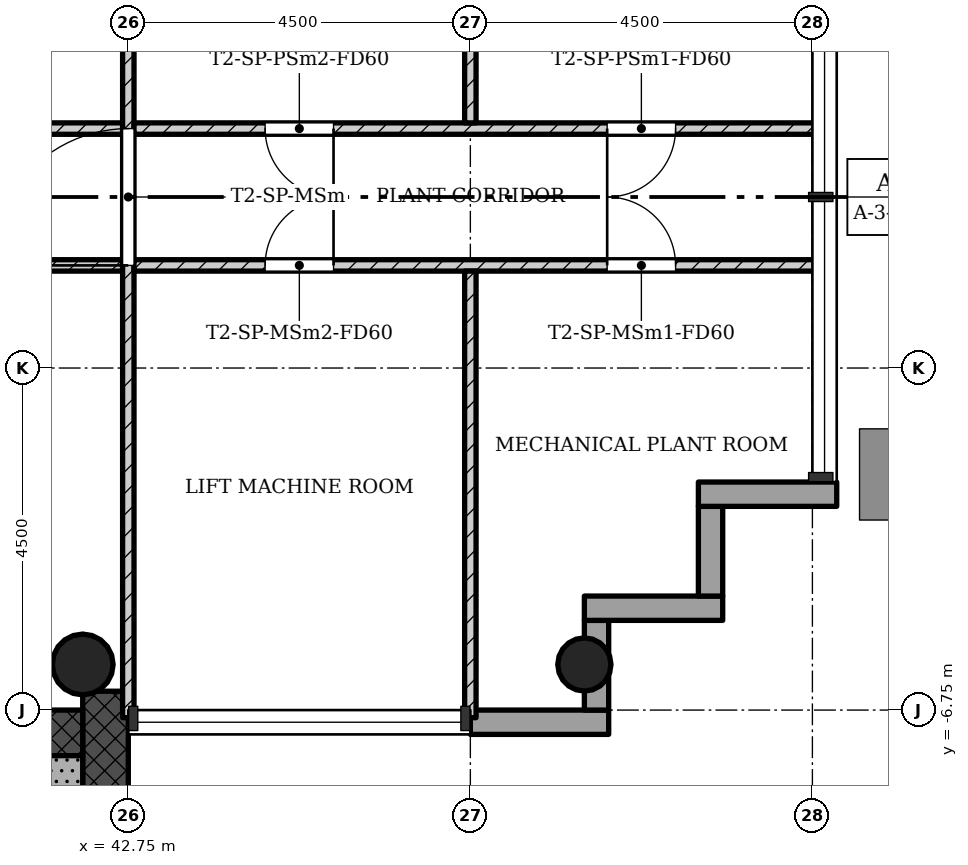
"""IFC4 building model, lengths in metres.
Left out: names, types, materials, properties, quantities, classifications, styles, units other than length and angle.
Written with IfcOpenShell. Run it as: python <this file> out.ifc"""

import sys

from ifc_helpers import new_model, si_unit, direction, frame, frame_2d, origin, origin_2d, place, context, subcontext, project, spatial, rectangle, hollow_circle, extrude, element, fill, save


model = new_model("IFC4")
c1 = context("Model", 3, precision=1e-05, world=origin(), true_north=direction((0.0, 1.0)))
c2 = subcontext(c1, "Body", "Model", "MODEL_VIEW")
j1 = project(units=[si_unit("LENGTHUNIT", "METRE"), si_unit("PLANEANGLEUNIT", "RADIAN")], contexts=[c1])
p1 = place(None, origin())
s1 = spatial("IfcSite", under=j1, at=p1, CompositionType="ELEMENT")
p2 = place(p1, origin())
s2 = spatial("IfcBuilding", under=s1, at=p2, CompositionType="ELEMENT")
p3 = place(p2, frame((0.0, 0.0, 233.4)))
s3 = spatial("IfcBuildingStorey", under=s2, at=p3, CompositionType="ELEMENT", Elevation=233.4)
p4 = place(p3, frame((42.45, -15.15, 0.0), z_axis=(0.0, 0.0, 1.0), x_axis=(0.0, 1.0, 0.0)))
e1 = element("IfcWall", 1, at=p4, inside=s3, PredefinedType="SHEAR", context=c2, shape_type="SweptSolid", body=[
    extrude(rectangle(XDim=8.648, YDim=0.6, at=frame_2d((4.324, 0.0))), origin(), (0.0, 0.0, 1.0), 4.5),
])
p5 = place(p3, frame((42.15, -7.05, 0.0), z_axis=(0.0, 0.0, 1.0), x_axis=(-1.0, 0.0, 0.0)))
e2 = element("IfcWall", 2, at=p5, inside=s3, PredefinedType="SHEAR", context=c2, shape_type="SweptSolid", body=[
    extrude(rectangle(XDim=12.9, YDim=0.6, at=frame_2d((6.45, 0.0))), origin(), (0.0, 0.0, 1.0), 4.5),
])
p6 = place(p5, frame((5.25, 0.0, 0.0)))
e3 = element("IfcOpeningElement", 3, at=p6, cuts=e2, PredefinedType="OPENING", context=c2, shape_type="SweptSolid", body=[
    extrude(rectangle(XDim=1.8, YDim=2.1, at=frame_2d((0.9, 1.05))), frame((0.0, 0.31, 0.0), z_axis=(0.0, -1.0, 0.0), x_axis=(1.0, 0.0, 0.0)), (0.0, 0.0, 1.0), 0.62),
])
p7 = place(p3, frame((48.75, -6.15, 0.0), z_axis=(0.0, 0.0, 1.0), x_axis=(1.0, 0.0, 0.0)))
e4 = element("IfcColumn", 4, at=p7, inside=s3, PredefinedType="COLUMN", context=c2, shape_type="SweptSolid", body=[
    extrude(hollow_circle(Radius=0.35, WallThickness=0.025, at=origin_2d()), origin(), (0.0, 0.0, 1.0), 4.5),
])
p8 = place(p3, frame((42.15, -6.15, 0.0), z_axis=(0.0, 0.0, 1.0), x_axis=(1.0, 0.0, 0.0)))
e5 = element("IfcColumn", 5, at=p8, inside=s3, PredefinedType="COLUMN", context=c2, shape_type="SweptSolid", body=[
    extrude(hollow_circle(Radius=0.4, WallThickness=0.028, at=origin_2d()), origin(), (0.0, 0.0, 1.0), 4.5),
])
p9 = place(p3, frame((47.25, -6.91, -0.3), z_axis=(0.0, 0.0, 1.0), x_axis=(1.0, 0.0, 0.0)))
e6 = element("IfcWall", 6, at=p9, inside=s3, PredefinedType="STANDARD", context=c2, shape_type="SweptSolid", body=[
    extrude(rectangle(XDim=1.82, YDim=0.32, at=frame_2d((0.91, 0.0))), origin(), (0.0, 0.0, 1.0), 4.5),
])
p10 = place(p3, frame((48.91, -6.75, -0.3), z_axis=(0.0, 0.0, 1.0), x_axis=(0.0, 1.0, 0.0)))
e7 = element("IfcWall", 7, at=p10, inside=s3, PredefinedType="STANDARD", context=c2, shape_type="SweptSolid", body=[
    extrude(rectangle(XDim=1.18, YDim=0.32, at=frame_2d((0.59, 0.0))), origin(), (0.0, 0.0, 1.0), 4.5),
])
p11 = place(p3, frame((48.75, -5.41, -0.3), z_axis=(0.0, 0.0, 1.0), x_axis=(1.0, 0.0, 0.0)))
e8 = element("IfcWall", 8, at=p11, inside=s3, PredefinedType="STANDARD", context=c2, shape_type="SweptSolid", body=[
    extrude(rectangle(XDim=1.82, YDim=0.32, at=frame_2d((0.91, 0.0))), origin(), (0.0, 0.0, 1.0), 4.5),
])
p12 = place(p3, frame((50.41, -5.25, -0.3), z_axis=(0.0, 0.0, 1.0), x_axis=(0.0, 1.0, 0.0)))
e9 = element("IfcWall", 9, at=p12, inside=s3, PredefinedType="STANDARD", context=c2, shape_type="SweptSolid", body=[
    extrude(rectangle(XDim=1.18, YDim=0.32, at=frame_2d((0.59, 0.0))), origin(), (0.0, 0.0, 1.0), 4.5),
])
p13 = place(p3, frame((50.25, -3.91, -0.3), z_axis=(0.0, 0.0, 1.0), x_axis=(1.0, 0.0, 0.0)))
e10 = element("IfcWall", 10, at=p13, inside=s3, PredefinedType="STANDARD", context=c2, shape_type="SweptSolid", body=[
    extrude(rectangle(XDim=1.82, YDim=0.32, at=frame_2d((0.91, 0.0))), origin(), (0.0, 0.0, 1.0), 4.5),
])
for number, where, z_axis, x_axis in (
    (11, (42.675, 0.9, 0.0), (0.0, 0.0, 1.0), (-1.0, 0.0, 0.0)),
    (12, (42.675, -0.9, 0.0), (0.0, 0.0, 1.0), (-1.0, 0.0, 0.0)),
):
    element("IfcWall", number, at=place(p3, frame(where, z_axis=z_axis, x_axis=x_axis)), inside=s3, PredefinedType="PARTITIONING", context=c2, shape_type="SweptSolid", body=[
        extrude(rectangle(XDim=5.7, YDim=0.15, at=frame_2d((2.85, 0.0))), origin(), (0.0, 0.0, 1.0), 4.1),
    ])
p14 = place(p3, frame((42.75, -6.85, 0.0), z_axis=(0.0, 0.0, 1.0), x_axis=(0.0, 1.0, 0.0)))
e13 = element("IfcWall", 13, at=p14, inside=s3, PredefinedType="PARTITIONING", context=c2, shape_type="SweptSolid", body=[
    extrude(rectangle(XDim=13.7, YDim=0.15, at=frame_2d((6.85, 0.0))), origin(), (0.0, 0.0, 1.0), 4.1),
])
p15 = place(p14, frame((5.95, 0.0, 0.0)))
e14 = element("IfcOpeningElement", 14, at=p15, cuts=e13, PredefinedType="OPENING", context=c2, shape_type="SweptSolid", body=[
    extrude(rectangle(XDim=1.8, YDim=2.1, at=frame_2d((0.9, 1.05))), frame((0.0, 0.085, 0.0), z_axis=(0.0, -1.0, 0.0), x_axis=(1.0, 0.0, 0.0)), (0.0, 0.0, 1.0), 0.17),
])
p16 = place(p3, frame((51.85, 0.9, 0.0), z_axis=(0.0, 0.0, 1.0), x_axis=(-1.0, 0.0, 0.0)))
e15 = element("IfcWall", 15, at=p16, inside=s3, PredefinedType="PARTITIONING", context=c2, shape_type="SweptSolid", body=[
    extrude(rectangle(XDim=9.025, YDim=0.15, at=frame_2d((4.513, 0.0))), origin(), (0.0, 0.0, 1.0), 4.1),
])
p17 = place(p16, frame((1.9, 0.0, 0.0)))
e16 = element("IfcOpeningElement", 16, at=p17, cuts=e15, PredefinedType="OPENING", context=c2, shape_type="SweptSolid", body=[
    extrude(rectangle(XDim=0.9, YDim=2.1, at=frame_2d((0.45, 1.05))), frame((0.0, 0.085, 0.0), z_axis=(0.0, -1.0, 0.0), x_axis=(1.0, 0.0, 0.0)), (0.0, 0.0, 1.0), 0.17),
])
p18 = place(p16, frame((6.4, 0.0, 0.0)))
e17 = element("IfcOpeningElement", 17, at=p18, cuts=e15, PredefinedType="OPENING", context=c2, shape_type="SweptSolid", body=[
    extrude(rectangle(XDim=0.9, YDim=2.1, at=frame_2d((0.45, 1.05))), frame((0.0, 0.085, 0.0), z_axis=(0.0, -1.0, 0.0), x_axis=(1.0, 0.0, 0.0)), (0.0, 0.0, 1.0), 0.17),
])
p19 = place(p3, frame((47.25, 0.975, 0.0), z_axis=(0.0, 0.0, 1.0), x_axis=(0.0, 1.0, 0.0)))
e18 = element("IfcWall", 18, at=p19, inside=s3, PredefinedType="PARTITIONING", context=c2, shape_type="SweptSolid", body=[
    extrude(rectangle(XDim=5.875, YDim=0.15, at=frame_2d((2.938, 0.0))), origin(), (0.0, 0.0, 1.0), 4.1),
])
p20 = place(p3, frame((51.85, -0.9, 0.0), z_axis=(0.0, 0.0, 1.0), x_axis=(-1.0, 0.0, 0.0)))
e19 = element("IfcWall", 19, at=p20, inside=s3, PredefinedType="PARTITIONING", context=c2, shape_type="SweptSolid", body=[
    extrude(rectangle(XDim=9.025, YDim=0.15, at=frame_2d((4.513, 0.0))), origin(), (0.0, 0.0, 1.0), 4.1),
])
p21 = place(p20, frame((1.9, 0.0, 0.0)))
e20 = element("IfcOpeningElement", 20, at=p21, cuts=e19, PredefinedType="OPENING", context=c2, shape_type="SweptSolid", body=[
    extrude(rectangle(XDim=0.9, YDim=2.1, at=frame_2d((0.45, 1.05))), frame((0.0, 0.085, 0.0), z_axis=(0.0, -1.0, 0.0), x_axis=(1.0, 0.0, 0.0)), (0.0, 0.0, 1.0), 0.17),
])
p22 = place(p20, frame((6.4, 0.0, 0.0)))
e21 = element("IfcOpeningElement", 21, at=p22, cuts=e19, PredefinedType="OPENING", context=c2, shape_type="SweptSolid", body=[
    extrude(rectangle(XDim=0.9, YDim=2.1, at=frame_2d((0.45, 1.05))), frame((0.0, 0.085, 0.0), z_axis=(0.0, -1.0, 0.0), x_axis=(1.0, 0.0, 0.0)), (0.0, 0.0, 1.0), 0.17),
])
p23 = place(p3, frame((47.25, -0.975, 0.0), z_axis=(0.0, 0.0, 1.0), x_axis=(0.0, -1.0, 0.0)))
e22 = element("IfcWall", 22, at=p23, inside=s3, PredefinedType="PARTITIONING", context=c2, shape_type="SweptSolid", body=[
    extrude(rectangle(XDim=5.875, YDim=0.15, at=frame_2d((2.938, 0.0))), origin(), (0.0, 0.0, 1.0), 4.1),
])
p24 = place(p3, frame((37.85, -7.65, 0.0), z_axis=(0.0, 0.0, 1.0), x_axis=(1.0, 0.0, 0.0)))
e23 = element("IfcWall", 23, at=p24, inside=s3, PredefinedType="SHEAR", context=c2, shape_type="SweptSolid", body=[
    extrude(rectangle(XDim=4.3, YDim=0.6, at=frame_2d((2.15, 0.0))), origin(), (0.0, 0.0, 1.0), 4.5),
])
p25 = place(p15, origin())
e24 = element("IfcDoor", 24, at=p25, inside=s3, OperationType="SINGLE_SWING_RIGHT", PredefinedType="DOOR", context=c2, shape_type="SweptSolid", body=[
    extrude(rectangle(XDim=1.8, YDim=2.1, at=frame_2d((0.9, 1.05))), frame((0.0, 0.025, 0.0), z_axis=(0.0, -1.0, 0.0), x_axis=(1.0, 0.0, 0.0)), (0.0, 0.0, 1.0), 0.05),
])
fill(e14, e24)
p26 = place(p17, origin())
e25 = element("IfcDoor", 25, at=p26, inside=s3, OperationType="SINGLE_SWING_LEFT", PredefinedType="DOOR", context=c2, shape_type="SweptSolid", body=[
    extrude(rectangle(XDim=0.9, YDim=2.1, at=frame_2d((0.45, 1.05))), frame((0.0, 0.025, 0.0), z_axis=(0.0, -1.0, 0.0), x_axis=(1.0, 0.0, 0.0)), (0.0, 0.0, 1.0), 0.05),
])
fill(e16, e25)
p27 = place(p18, origin())
e26 = element("IfcDoor", 26, at=p27, inside=s3, OperationType="SINGLE_SWING_RIGHT", PredefinedType="DOOR", context=c2, shape_type="SweptSolid", body=[
    extrude(rectangle(XDim=0.9, YDim=2.1, at=frame_2d((0.45, 1.05))), frame((0.0, 0.025, 0.0), z_axis=(0.0, -1.0, 0.0), x_axis=(1.0, 0.0, 0.0)), (0.0, 0.0, 1.0), 0.05),
])
fill(e17, e26)
p28 = place(p21, origin())
e27 = element("IfcDoor", 27, at=p28, inside=s3, OperationType="SINGLE_SWING_RIGHT", PredefinedType="DOOR", context=c2, shape_type="SweptSolid", body=[
    extrude(rectangle(XDim=0.9, YDim=2.1, at=frame_2d((0.45, 1.05))), frame((0.0, 0.025, 0.0), z_axis=(0.0, -1.0, 0.0), x_axis=(1.0, 0.0, 0.0)), (0.0, 0.0, 1.0), 0.05),
])
fill(e20, e27)
p29 = place(p22, origin())
e28 = element("IfcDoor", 28, at=p29, inside=s3, OperationType="SINGLE_SWING_LEFT", PredefinedType="DOOR", context=c2, shape_type="SweptSolid", body=[
    extrude(rectangle(XDim=0.9, YDim=2.1, at=frame_2d((0.45, 1.05))), frame((0.0, 0.025, 0.0), z_axis=(0.0, -1.0, 0.0), x_axis=(1.0, 0.0, 0.0)), (0.0, 0.0, 1.0), 0.05),
])
fill(e21, e28)
save(model, sys.argv[1])
